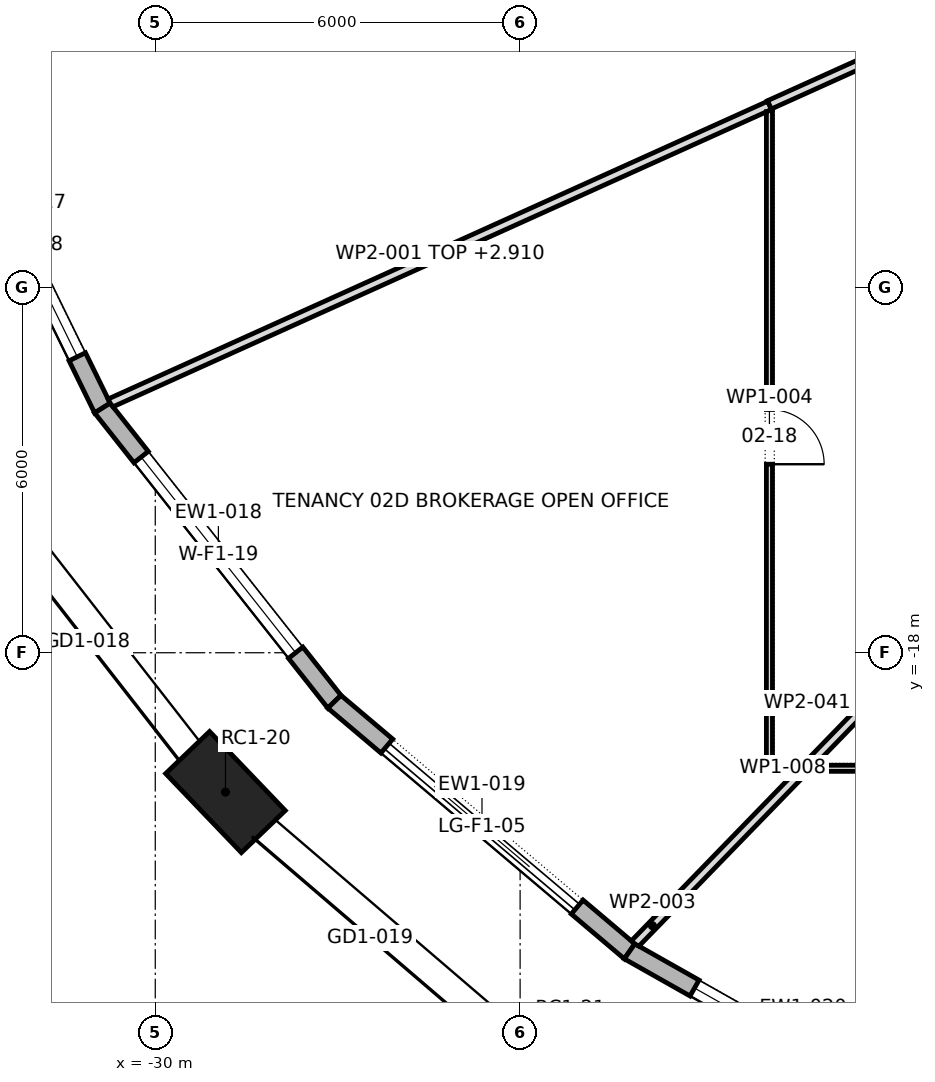
"""IFC4 building model, lengths in metres.
Left out: names, types, materials, properties, quantities, classifications, styles, units other than length and angle.
Written with IfcOpenShell. Run it as: python <this file> out.ifc"""

import sys

from ifc_helpers import new_model, si_unit, direction, frame, frame_2d, origin, origin_2d, place, context, subcontext, project, spatial, polyline, rectangle, outline, extrude, element, fill, save


model = new_model("IFC4")
c1 = context("Model", 3, precision=1e-05, world=origin(), true_north=direction((0.0, 1.0)))
c2 = subcontext(c1, "Body", "Model", "MODEL_VIEW")
j1 = project(units=[si_unit("LENGTHUNIT", "METRE"), si_unit("PLANEANGLEUNIT", "RADIAN")], contexts=[c1])
p1 = place(None, origin())
s1 = spatial("IfcSite", under=j1, at=p1, CompositionType="ELEMENT")
p2 = place(p1, origin())
s2 = spatial("IfcBuilding", under=s1, at=p2, CompositionType="ELEMENT")
p3 = place(p2, frame((0.0, 0.0, 44.5)))
s3 = spatial("IfcBuildingStorey", under=s2, at=p3, CompositionType="ELEMENT", Elevation=44.5)
p4 = place(p3, frame((-28.845, -20.291, 0.0), z_axis=(0.0, 0.0, 1.0), x_axis=(0.691576091297, -0.722303613411, 0.0)))
e1 = element("IfcColumn", 1, at=p4, inside=s3, PredefinedType="COLUMN", context=c2, shape_type="SweptSolid", body=[
    extrude(rectangle(XDim=1.8, YDim=1.0, at=origin_2d()), origin(), (0.0, 0.0, 1.0), 4.2),
])
p5 = place(p3, frame((-33.499, -8.608, 0.0), z_axis=(0.0, 0.0, 1.0), x_axis=(0.439896354052, -0.898048549741, 0.0)))
e2 = element("IfcWall", 2, at=p5, inside=s3, PredefinedType="STANDARD", context=c2, shape_type="SweptSolid", body=[
    extrude(outline(polyline([(-0.017, -0.15), (5.994, -0.15), (5.962, 0.15), (0.017, 0.15), (-0.017, -0.15)])), origin(), (0.0, 0.0, 1.0), 3.9),
])
p6 = place(p5, frame((0.939, 0.0, 0.6)))
e3 = element("IfcOpeningElement", 3, at=p6, cuts=e2, PredefinedType="OPENING", context=c2, shape_type="SweptSolid", body=[
    extrude(rectangle(XDim=4.1, YDim=2.85, at=frame_2d((2.05, 1.425))), frame((0.0, 0.162, 0.0), z_axis=(0.0, -1.0, 0.0), x_axis=(1.0, 0.0, 0.0)), (0.0, 0.0, 1.0), 0.324),
])
p7 = place(p3, frame((-30.869, -13.976, 0.0), z_axis=(0.0, 0.0, 1.0), x_axis=(0.61992334328, -0.784662378642, 0.0)))
e4 = element("IfcWall", 4, at=p7, inside=s3, PredefinedType="STANDARD", context=c2, shape_type="SweptSolid", body=[
    extrude(outline(polyline([(-0.016, -0.15), (6.17, -0.15), (6.14, 0.15), (0.016, 0.15), (-0.016, -0.15)])), origin(), (0.0, 0.0, 1.0), 3.9),
])
p8 = place(p7, frame((1.027, 0.0, 0.6)))
e5 = element("IfcOpeningElement", 5, at=p8, cuts=e4, PredefinedType="OPENING", context=c2, shape_type="SweptSolid", body=[
    extrude(rectangle(XDim=4.1, YDim=2.85, at=frame_2d((2.05, 1.425))), frame((0.0, 0.162, 0.0), z_axis=(0.0, -1.0, 0.0), x_axis=(1.0, 0.0, 0.0)), (0.0, 0.0, 1.0), 0.324),
])
p9 = place(p3, frame((-27.054, -18.806, 0.0), z_axis=(0.0, 0.0, 1.0), x_axis=(0.763577077796, -0.645716691951, 0.0)))
e6 = element("IfcWall", 6, at=p9, inside=s3, PredefinedType="STANDARD", context=c2, shape_type="SweptSolid", body=[
    extrude(outline(polyline([(-0.015, -0.15), (6.371, -0.15), (6.343, 0.15), (0.015, 0.15), (-0.015, -0.15)])), origin(), (0.0, 0.0, 1.0), 3.9),
])
p10 = place(p9, frame((1.129, 0.0, 0.0)))
e7 = element("IfcOpeningElement", 7, at=p10, cuts=e6, PredefinedType="OPENING", context=c2, shape_type="SweptSolid", body=[
    extrude(rectangle(XDim=4.1, YDim=3.45, at=frame_2d((2.05, 1.725))), frame((0.0, 0.162, 0.0), z_axis=(0.0, -1.0, 0.0), x_axis=(1.0, 0.0, 0.0)), (0.0, 0.0, 1.0), 0.324),
])
p11 = place(p3, frame((-22.2, -22.911, 0.0), z_axis=(0.0, 0.0, 1.0), x_axis=(0.87061279013, -0.491968870623, 0.0)))
e8 = element("IfcWall", 8, at=p11, inside=s3, PredefinedType="STANDARD", context=c2, shape_type="SweptSolid", body=[
    extrude(outline(polyline([(-0.014, -0.15), (6.567, -0.15), (6.54, 0.15), (0.014, 0.15), (-0.014, -0.15)])), origin(), (0.0, 0.0, 1.0), 3.9),
])
p12 = place(p11, frame((1.227, 0.0, 0.6)))
e9 = element("IfcOpeningElement", 9, at=p12, cuts=e8, PredefinedType="OPENING", context=c2, shape_type="SweptSolid", body=[
    extrude(rectangle(XDim=4.1, YDim=2.85, at=frame_2d((2.05, 1.425))), frame((0.0, 0.162, 0.0), z_axis=(0.0, -1.0, 0.0), x_axis=(1.0, 0.0, 0.0)), (0.0, 0.0, 1.0), 0.324),
])
p13 = place(p3, frame((-30.744, -13.896, 0.0), z_axis=(0.0, 0.0, 1.0), x_axis=(0.91143189519, 0.411450969654, 0.0)))
e10 = element("IfcWall", 10, at=p13, inside=s3, PredefinedType="PARTITIONING", context=c2, shape_type="SweptSolid", body=[
    extrude(outline(polyline([(0.021, -0.075), (1.985, -0.075), (3.95, -0.075), (5.915, -0.075), (7.88, -0.075), (9.845, -0.075), (11.81, -0.075), (11.811, -0.073), (11.815, -0.075), (11.902, -0.075), (11.902, -0.066), (11.902, -0.066), (11.902, 0.062), (11.902, 0.075), (9.919, 0.075), (7.935, 0.075), (5.951, 0.075), (3.968, 0.075), (1.984, 0.075), (0.0, 0.075), (0.0, 0.066), (0.002, -0.001), (0.021, -0.075)])), origin(), (0.0, 0.0, 1.0), 2.91),
])
p14 = place(p3, frame((-22.117, -22.791, 0.0), z_axis=(0.0, 0.0, 1.0), x_axis=(0.696613128163, 0.717446966452, 0.0)))
e11 = element("IfcWall", 11, at=p14, inside=s3, PredefinedType="PARTITIONING", context=c2, shape_type="SweptSolid", body=[
    extrude(outline(polyline([(0.0, 0.075), (0.0, 0.071), (0.005, 0.0), (0.025, -0.075), (0.832, -0.075), (0.832, 0.075), (0.0, 0.075)])), origin(), (0.0, 0.0, 1.0), 3.9),
])
p15 = place(p3, frame((-19.9, -19.95, 0.0), z_axis=(0.0, 0.0, 1.0), x_axis=(0.0, 1.0, 0.0)))
e12 = element("IfcWall", 12, at=p15, inside=s3, PredefinedType="PARTITIONING", context=c2, shape_type="SweptSolid", body=[
    extrude(outline(polyline([(10.9, -0.05), (10.9, -0.049), (10.892, -0.031), (10.883, -0.034), (10.845, 0.05), (9.038, 0.05), (7.23, 0.05), (5.423, 0.05), (3.615, 0.05), (1.808, 0.05), (0.0, 0.05), (0.1, -0.05), (0.1, -0.05), (1.9, -0.05), (3.7, -0.05), (5.5, -0.05), (7.3, -0.05), (9.1, -0.05), (10.9, -0.05)])), origin(), (0.0, 0.0, 1.0), 3.9),
])
p16 = place(p15, frame((5.05, 0.0, 0.0)))
e13 = element("IfcOpeningElement", 13, at=p16, cuts=e12, PredefinedType="OPENING", context=c2, shape_type="SweptSolid", body=[
    extrude(rectangle(XDim=0.9, YDim=2.1, at=frame_2d((0.45, 1.05))), frame((0.0, 0.062, 0.0), z_axis=(0.0, -1.0, 0.0), x_axis=(1.0, 0.0, 0.0)), (0.0, 0.0, 1.0), 0.124),
])
p17 = place(p3, frame((-19.9, -8.99, 0.0), z_axis=(0.0, 0.0, 1.0), x_axis=(0.911546381607, 0.411197269178, 0.0)))
e14 = element("IfcWall", 14, at=p17, inside=s3, PredefinedType="PARTITIONING", context=c2, shape_type="SweptSolid", body=[
    extrude(outline(polyline([(0.02, -0.075), (1.62, -0.075), (3.22, -0.075), (4.821, -0.075), (4.888, 0.075), (3.259, 0.075), (1.629, 0.075), (0.0, 0.075), (0.0, -0.066), (0.02, -0.075)])), origin(), (0.0, 0.0, 1.0), 2.91),
])
p18 = place(p3, frame((-19.46, -19.9, 0.0), z_axis=(0.0, 0.0, 1.0), x_axis=(-1.0, 0.0, 0.0)))
e15 = element("IfcWall", 15, at=p18, inside=s3, PredefinedType="PARTITIONING", context=c2, shape_type="SweptSolid", body=[
    extrude(outline(polyline([(0.0, -0.05), (0.39, -0.05), (0.49, 0.05), (0.0, 0.05), (0.0, -0.05)])), origin(), (0.0, 0.0, 1.0), 3.9),
])
p19 = place(p3, frame((-7.198, -19.9, 0.0), z_axis=(0.0, 0.0, 1.0), x_axis=(-1.0, 0.0, 0.0)))
e16 = element("IfcWall", 16, at=p19, inside=s3, PredefinedType="PARTITIONING", context=c2, shape_type="SweptSolid", body=[
    extrude(outline(polyline([(0.0, -0.05), (1.993, -0.05), (3.986, -0.05), (5.979, -0.05), (7.972, -0.05), (9.965, -0.05), (11.958, -0.05), (12.055, 0.05), (12.055, 0.05), (10.338, 0.05), (8.621, 0.05), (6.904, 0.05), (5.187, 0.05), (3.47, 0.05), (1.753, 0.05), (0.035, 0.05), (0.0, -0.049), (0.0, -0.05)])), origin(), (0.0, 0.0, 1.0), 3.9),
])
p20 = place(p19, frame((5.577, 0.0, 0.0)))
e17 = element("IfcOpeningElement", 17, at=p20, cuts=e16, PredefinedType="OPENING", context=c2, shape_type="SweptSolid", body=[
    extrude(rectangle(XDim=0.9, YDim=2.1, at=frame_2d((0.45, 1.05))), frame((0.0, 0.062, 0.0), z_axis=(0.0, -1.0, 0.0), x_axis=(1.0, 0.0, 0.0)), (0.0, 0.0, 1.0), 0.124),
])
p21 = place(p3, frame((-21.537, -22.194, 0.0), z_axis=(0.0, 0.0, 1.0), x_axis=(0.696644213118, 0.71741678286, 0.0)))
e18 = element("IfcWall", 18, at=p21, inside=s3, PredefinedType="PARTITIONING", context=c2, shape_type="SweptSolid", body=[
    extrude(outline(polyline([(0.0, -0.075), (1.667, -0.075), (3.335, -0.075), (3.337, -0.073), (3.34, -0.075), (4.864, -0.075), (6.389, -0.075), (7.913, -0.075), (9.438, -0.075), (9.438, -0.074), (9.345, 0.021), (9.345, 0.021), (9.292, 0.075), (7.734, 0.075), (6.176, 0.075), (4.617, 0.075), (3.059, 0.075), (3.057, 0.073), (3.055, 0.075), (1.527, 0.075), (0.0, 0.075), (0.0, -0.075)])), origin(), (0.0, 0.0, 1.0), 3.147),
])
p22 = place(p6, origin())
e19 = element("IfcWindow", 19, at=p22, inside=s3, PartitioningType="TRIPLE_PANEL_VERTICAL", PredefinedType="WINDOW", context=c2, shape_type="SweptSolid", body=[
    extrude(rectangle(XDim=4.1, YDim=2.85, at=frame_2d((2.05, 1.425))), frame((0.0, 0.03, 0.0), z_axis=(0.0, -1.0, 0.0), x_axis=(1.0, 0.0, 0.0)), (0.0, 0.0, 1.0), 0.06),
])
fill(e3, e19)
p23 = place(p8, origin())
e20 = element("IfcWindow", 20, at=p23, inside=s3, PartitioningType="TRIPLE_PANEL_VERTICAL", PredefinedType="WINDOW", context=c2, shape_type="SweptSolid", body=[
    extrude(rectangle(XDim=4.1, YDim=2.85, at=frame_2d((2.05, 1.425))), frame((0.0, 0.03, 0.0), z_axis=(0.0, -1.0, 0.0), x_axis=(1.0, 0.0, 0.0)), (0.0, 0.0, 1.0), 0.06),
])
fill(e5, e20)
p24 = place(p10, origin())
e21 = element("IfcDoor", 21, at=p24, inside=s3, OperationType="DOUBLE_DOOR_SLIDING", PredefinedType="DOOR", context=c2, shape_type="SweptSolid", body=[
    extrude(rectangle(XDim=4.1, YDim=3.45, at=frame_2d((2.05, 1.725))), frame((0.0, 0.025, 0.0), z_axis=(0.0, -1.0, 0.0), x_axis=(1.0, 0.0, 0.0)), (0.0, 0.0, 1.0), 0.05),
])
fill(e7, e21)
p25 = place(p12, origin())
e22 = element("IfcWindow", 22, at=p25, inside=s3, PartitioningType="TRIPLE_PANEL_VERTICAL", PredefinedType="WINDOW", context=c2, shape_type="SweptSolid", body=[
    extrude(rectangle(XDim=4.1, YDim=2.85, at=frame_2d((2.05, 1.425))), frame((0.0, 0.03, 0.0), z_axis=(0.0, -1.0, 0.0), x_axis=(1.0, 0.0, 0.0)), (0.0, 0.0, 1.0), 0.06),
])
fill(e9, e22)
p26 = place(p16, frame((0.9, 0.0, 0.0), z_axis=(0.0, 0.0, 1.0), x_axis=(-1.0, 0.0, 0.0)))
e23 = element("IfcDoor", 23, at=p26, inside=s3, OperationType="SINGLE_SWING_LEFT", PredefinedType="DOOR", context=c2, shape_type="SweptSolid", body=[
    extrude(rectangle(XDim=0.9, YDim=2.1, at=frame_2d((0.45, 1.05))), frame((0.0, 0.025, 0.0), z_axis=(0.0, -1.0, 0.0), x_axis=(1.0, 0.0, 0.0)), (0.0, 0.0, 1.0), 0.05),
])
fill(e13, e23)
save(model, sys.argv[1])
